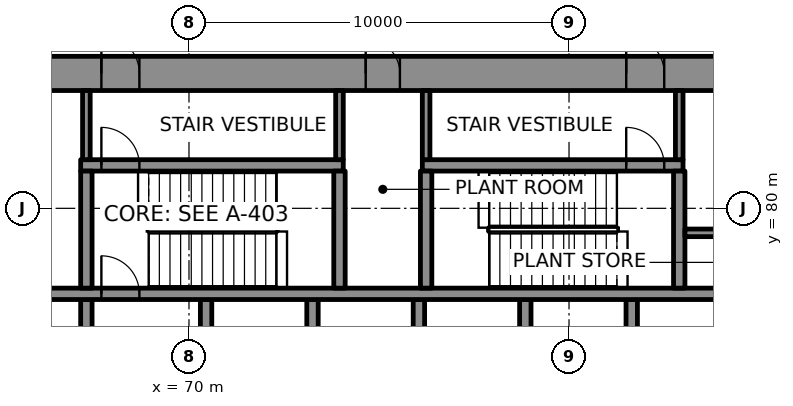
"""IFC4 building model, lengths in metres.
Left out: names, types, materials, properties, quantities, classifications, styles, units other than length and angle.
Written with IfcOpenShell. Run it as: python <this file> out.ifc"""

import sys

from ifc_helpers import new_model, si_unit, direction, frame, frame_2d, origin, place, context, subcontext, project, spatial, rectangle, extrude, element, fill, save


model = new_model("IFC4")
c1 = context("Model", 3, precision=1e-05, world=origin(), true_north=direction((0.0, 1.0)))
c2 = subcontext(c1, "Body", "Model", "MODEL_VIEW")
j1 = project(units=[si_unit("LENGTHUNIT", "METRE"), si_unit("PLANEANGLEUNIT", "RADIAN")], contexts=[c1])
p1 = place(None, origin())
s1 = spatial("IfcSite", under=j1, at=p1, CompositionType="ELEMENT")
p2 = place(p1, origin())
s2 = spatial("IfcBuilding", under=s1, at=p2, CompositionType="ELEMENT")
p3 = place(p2, frame((0.0, 0.0, 31.0)))
s3 = spatial("IfcBuildingStorey", under=s2, at=p3, CompositionType="ELEMENT", Elevation=31.0)
p4 = place(p3, frame((62.0, 83.55, 0.0), z_axis=(0.0, 0.0, 1.0), x_axis=(1.0, 0.0, 0.0)))
e1 = element("IfcWall", 1, at=p4, inside=s3, PredefinedType="SHEAR", context=c2, shape_type="SweptSolid", body=[
    extrude(rectangle(XDim=26.0, YDim=0.9, at=frame_2d((13.0, 0.0))), origin(), (0.0, 0.0, 1.0), 4.05),
])
p5 = place(p4, frame((5.695, 0.0, 0.0)))
e2 = element("IfcOpeningElement", 2, at=p5, cuts=e1, PredefinedType="OPENING", context=c2, shape_type="SweptSolid", body=[
    extrude(rectangle(XDim=1.0, YDim=2.1, at=frame_2d((0.5, 1.05))), frame((0.0, 0.46, 0.0), z_axis=(0.0, -1.0, 0.0), x_axis=(1.0, 0.0, 0.0)), (0.0, 0.0, 1.0), 0.92),
])
p6 = place(p4, frame((19.505, 0.0, 0.0)))
e3 = element("IfcOpeningElement", 3, at=p6, cuts=e1, PredefinedType="OPENING", context=c2, shape_type="SweptSolid", body=[
    extrude(rectangle(XDim=1.0, YDim=2.1, at=frame_2d((0.5, 1.05))), frame((0.0, 0.46, 0.0), z_axis=(0.0, -1.0, 0.0), x_axis=(1.0, 0.0, 0.0)), (0.0, 0.0, 1.0), 0.92),
])
p7 = place(p4, frame((3.45, 0.0, 0.0)))
e4 = element("IfcOpeningElement", 4, at=p7, cuts=e1, PredefinedType="OPENING", context=c2, shape_type="SweptSolid", body=[
    extrude(rectangle(XDim=0.9, YDim=2.1, at=frame_2d((0.45, 1.05))), frame((0.0, 0.46, 0.0), z_axis=(0.0, -1.0, 0.0), x_axis=(1.0, 0.0, 0.0)), (0.0, 0.0, 1.0), 0.92),
])
p8 = place(p4, frame((12.65, 0.0, 0.0)))
e5 = element("IfcOpeningElement", 5, at=p8, cuts=e1, PredefinedType="OPENING", context=c2, shape_type="SweptSolid", body=[
    extrude(rectangle(XDim=0.9, YDim=2.1, at=frame_2d((0.45, 1.05))), frame((0.0, 0.46, 0.0), z_axis=(0.0, -1.0, 0.0), x_axis=(1.0, 0.0, 0.0)), (0.0, 0.0, 1.0), 0.92),
])
p9 = place(p4, frame((22.55, 0.0, 0.0)))
e6 = element("IfcOpeningElement", 6, at=p9, cuts=e1, PredefinedType="OPENING", context=c2, shape_type="SweptSolid", body=[
    extrude(rectangle(XDim=0.9, YDim=2.1, at=frame_2d((0.45, 1.05))), frame((0.0, 0.46, 0.0), z_axis=(0.0, -1.0, 0.0), x_axis=(1.0, 0.0, 0.0)), (0.0, 0.0, 1.0), 0.92),
])
p10 = place(p3, frame((67.3, 75.0, 0.0), z_axis=(0.0, 0.0, 1.0), x_axis=(0.0, 1.0, 0.0)))
e7 = element("IfcWall", 7, at=p10, inside=s3, PredefinedType="SHEAR", context=c2, shape_type="SweptSolid", body=[
    extrude(rectangle(XDim=2.6, YDim=0.3, at=frame_2d((1.3, 0.0))), origin(), (0.0, 0.0, 1.0), 4.05),
])
p11 = place(p3, frame((70.45, 75.0, 0.0), z_axis=(0.0, 0.0, 1.0), x_axis=(0.0, 1.0, 0.0)))
e8 = element("IfcWall", 8, at=p11, inside=s3, PredefinedType="SHEAR", context=c2, shape_type="SweptSolid", body=[
    extrude(rectangle(XDim=2.6, YDim=0.3, at=frame_2d((1.3, 0.0))), origin(), (0.0, 0.0, 1.0), 4.05),
])
p12 = place(p11, frame((0.15, 0.0, 0.0)))
e9 = element("IfcOpeningElement", 9, at=p12, cuts=e8, PredefinedType="OPENING", context=c2, shape_type="SweptSolid", body=[
    extrude(rectangle(XDim=1.1, YDim=2.1, at=frame_2d((0.55, 1.05))), frame((0.0, 0.16, 0.0), z_axis=(0.0, -1.0, 0.0), x_axis=(1.0, 0.0, 0.0)), (0.0, 0.0, 1.0), 0.32),
])
for number, where, z_axis, x_axis in (
    (10, (73.25, 75.0, 0.0), (0.0, 0.0, 1.0), (0.0, 1.0, 0.0)),
    (11, (76.05, 75.0, 0.0), (0.0, 0.0, 1.0), (0.0, 1.0, 0.0)),
    (12, (78.85, 75.0, 0.0), (0.0, 0.0, 1.0), (0.0, 1.0, 0.0)),
    (13, (81.65, 75.0, 0.0), (0.0, 0.0, 1.0), (0.0, 1.0, 0.0)),
):
    element("IfcWall", number, at=place(p3, frame(where, z_axis=z_axis, x_axis=x_axis)), inside=s3, PredefinedType="SHEAR", context=c2, shape_type="SweptSolid", body=[
        extrude(rectangle(XDim=2.6, YDim=0.3, at=frame_2d((1.3, 0.0))), origin(), (0.0, 0.0, 1.0), 4.05),
    ])
p13 = place(p3, frame((64.35, 77.75, 0.0), z_axis=(0.0, 0.0, 1.0), x_axis=(1.0, 0.0, 0.0)))
e14 = element("IfcWall", 14, at=p13, inside=s3, PredefinedType="SHEAR", context=c2, shape_type="SweptSolid", body=[
    extrude(rectangle(XDim=22.75, YDim=0.3, at=frame_2d((11.375, 0.0))), origin(), (0.0, 0.0, 1.0), 4.05),
])
p14 = place(p13, frame((3.345, 0.0, 0.0)))
e15 = element("IfcOpeningElement", 15, at=p14, cuts=e14, PredefinedType="OPENING", context=c2, shape_type="SweptSolid", body=[
    extrude(rectangle(XDim=1.0, YDim=2.1, at=frame_2d((0.5, 1.05))), frame((0.0, 0.16, 0.0), z_axis=(0.0, -1.0, 0.0), x_axis=(1.0, 0.0, 0.0)), (0.0, 0.0, 1.0), 0.32),
])
p15 = place(p3, frame((67.15, 81.13, 0.0), z_axis=(0.0, 0.0, 1.0), x_axis=(1.0, 0.0, 0.0)))
e16 = element("IfcWall", 16, at=p15, inside=s3, PredefinedType="SHEAR", context=c2, shape_type="SweptSolid", body=[
    extrude(rectangle(XDim=6.91, YDim=0.3, at=frame_2d((3.455, 0.0))), origin(), (0.0, 0.0, 1.0), 4.05),
])
p16 = place(p15, frame((0.545, 0.0, 0.0)))
e17 = element("IfcOpeningElement", 17, at=p16, cuts=e16, PredefinedType="OPENING", context=c2, shape_type="SweptSolid", body=[
    extrude(rectangle(XDim=1.0, YDim=2.1, at=frame_2d((0.5, 1.05))), frame((0.0, 0.16, 0.0), z_axis=(0.0, -1.0, 0.0), x_axis=(1.0, 0.0, 0.0)), (0.0, 0.0, 1.0), 0.32),
])
p17 = place(p3, frame((76.14, 81.13, 0.0), z_axis=(0.0, 0.0, 1.0), x_axis=(1.0, 0.0, 0.0)))
e18 = element("IfcWall", 18, at=p17, inside=s3, PredefinedType="SHEAR", context=c2, shape_type="SweptSolid", body=[
    extrude(rectangle(XDim=6.86, YDim=0.3, at=frame_2d((3.43, 0.0))), origin(), (0.0, 0.0, 1.0), 4.05),
])
p18 = place(p17, frame((5.365, 0.0, 0.0)))
e19 = element("IfcOpeningElement", 19, at=p18, cuts=e18, PredefinedType="OPENING", context=c2, shape_type="SweptSolid", body=[
    extrude(rectangle(XDim=1.0, YDim=2.1, at=frame_2d((0.5, 1.05))), frame((0.0, 0.16, 0.0), z_axis=(0.0, -1.0, 0.0), x_axis=(1.0, 0.0, 0.0)), (0.0, 0.0, 1.0), 0.32),
])
for number, where, z_axis, x_axis in (
    (20, (67.3, 77.9, 0.0), (0.0, 0.0, 1.0), (0.0, 1.0, 0.0)),
    (21, (73.96, 77.9, 0.0), (0.0, 0.0, 1.0), (0.0, 1.0, 0.0)),
    (22, (76.24, 77.9, 0.0), (0.0, 0.0, 1.0), (0.0, 1.0, 0.0)),
    (23, (82.9, 77.9, 0.0), (0.0, 0.0, 1.0), (0.0, 1.0, 0.0)),
):
    element("IfcWall", number, at=place(p3, frame(where, z_axis=z_axis, x_axis=x_axis)), inside=s3, PredefinedType="SHEAR", context=c2, shape_type="SweptSolid", body=[
        extrude(rectangle(XDim=3.08, YDim=0.3, at=frame_2d((1.54, 0.0))), origin(), (0.0, 0.0, 1.0), 4.05),
    ])
p19 = place(p3, frame((107.504, 60.451, 0.0), z_axis=(0.0, 0.0, 1.0), x_axis=(-0.500000550228, 0.86602508611, 0.0)))
e24 = element("IfcWall", 24, at=p19, inside=s3, PredefinedType="SOLIDWALL", context=c2, shape_type="SweptSolid", body=[
    extrude(rectangle(XDim=57.704, YDim=0.3, at=frame_2d((28.852, 0.0))), origin(), (0.0, 0.0, 1.0), 4.05),
])
p20 = place(p19, frame((0.89, 0.0, 0.8)))
e25 = element("IfcOpeningElement", 25, at=p20, cuts=e24, PredefinedType="OPENING", context=c2, shape_type="SweptSolid", body=[
    extrude(rectangle(XDim=3.0, YDim=2.4, at=frame_2d((1.5, 1.2))), frame((0.0, 0.16, 0.0), z_axis=(0.0, -1.0, 0.0), x_axis=(1.0, 0.0, 0.0)), (0.0, 0.0, 1.0), 0.32),
])
p21 = place(p19, frame((4.67, 0.0, 0.8)))
e26 = element("IfcOpeningElement", 26, at=p21, cuts=e24, PredefinedType="OPENING", context=c2, shape_type="SweptSolid", body=[
    extrude(rectangle(XDim=3.0, YDim=2.4, at=frame_2d((1.5, 1.2))), frame((0.0, 0.16, 0.0), z_axis=(0.0, -1.0, 0.0), x_axis=(1.0, 0.0, 0.0)), (0.0, 0.0, 1.0), 0.32),
])
p22 = place(p19, frame((8.451, 0.0, 0.8)))
e27 = element("IfcOpeningElement", 27, at=p22, cuts=e24, PredefinedType="OPENING", context=c2, shape_type="SweptSolid", body=[
    extrude(rectangle(XDim=3.0, YDim=2.4, at=frame_2d((1.5, 1.2))), frame((0.0, 0.16, 0.0), z_axis=(0.0, -1.0, 0.0), x_axis=(1.0, 0.0, 0.0)), (0.0, 0.0, 1.0), 0.32),
])
p23 = place(p19, frame((12.231, 0.0, 0.8)))
e28 = element("IfcOpeningElement", 28, at=p23, cuts=e24, PredefinedType="OPENING", context=c2, shape_type="SweptSolid", body=[
    extrude(rectangle(XDim=3.0, YDim=2.4, at=frame_2d((1.5, 1.2))), frame((0.0, 0.16, 0.0), z_axis=(0.0, -1.0, 0.0), x_axis=(1.0, 0.0, 0.0)), (0.0, 0.0, 1.0), 0.32),
])
p24 = place(p19, frame((16.011, 0.0, 0.8)))
e29 = element("IfcOpeningElement", 29, at=p24, cuts=e24, PredefinedType="OPENING", context=c2, shape_type="SweptSolid", body=[
    extrude(rectangle(XDim=3.0, YDim=2.4, at=frame_2d((1.5, 1.2))), frame((0.0, 0.16, 0.0), z_axis=(0.0, -1.0, 0.0), x_axis=(1.0, 0.0, 0.0)), (0.0, 0.0, 1.0), 0.32),
])
p25 = place(p19, frame((19.792, 0.0, 0.8)))
e30 = element("IfcOpeningElement", 30, at=p25, cuts=e24, PredefinedType="OPENING", context=c2, shape_type="SweptSolid", body=[
    extrude(rectangle(XDim=3.0, YDim=2.4, at=frame_2d((1.5, 1.2))), frame((0.0, 0.16, 0.0), z_axis=(0.0, -1.0, 0.0), x_axis=(1.0, 0.0, 0.0)), (0.0, 0.0, 1.0), 0.32),
])
p26 = place(p19, frame((23.572, 0.0, 0.8)))
e31 = element("IfcOpeningElement", 31, at=p26, cuts=e24, PredefinedType="OPENING", context=c2, shape_type="SweptSolid", body=[
    extrude(rectangle(XDim=3.0, YDim=2.4, at=frame_2d((1.5, 1.2))), frame((0.0, 0.16, 0.0), z_axis=(0.0, -1.0, 0.0), x_axis=(1.0, 0.0, 0.0)), (0.0, 0.0, 1.0), 0.32),
])
p27 = place(p19, frame((27.352, 0.0, 0.8)))
e32 = element("IfcOpeningElement", 32, at=p27, cuts=e24, PredefinedType="OPENING", context=c2, shape_type="SweptSolid", body=[
    extrude(rectangle(XDim=3.0, YDim=2.4, at=frame_2d((1.5, 1.2))), frame((0.0, 0.16, 0.0), z_axis=(0.0, -1.0, 0.0), x_axis=(1.0, 0.0, 0.0)), (0.0, 0.0, 1.0), 0.32),
])
p28 = place(p19, frame((31.132, 0.0, 0.8)))
e33 = element("IfcOpeningElement", 33, at=p28, cuts=e24, PredefinedType="OPENING", context=c2, shape_type="SweptSolid", body=[
    extrude(rectangle(XDim=3.0, YDim=2.4, at=frame_2d((1.5, 1.2))), frame((0.0, 0.16, 0.0), z_axis=(0.0, -1.0, 0.0), x_axis=(1.0, 0.0, 0.0)), (0.0, 0.0, 1.0), 0.32),
])
p29 = place(p19, frame((34.913, 0.0, 0.8)))
e34 = element("IfcOpeningElement", 34, at=p29, cuts=e24, PredefinedType="OPENING", context=c2, shape_type="SweptSolid", body=[
    extrude(rectangle(XDim=3.0, YDim=2.4, at=frame_2d((1.5, 1.2))), frame((0.0, 0.16, 0.0), z_axis=(0.0, -1.0, 0.0), x_axis=(1.0, 0.0, 0.0)), (0.0, 0.0, 1.0), 0.32),
])
p30 = place(p19, frame((38.693, 0.0, 0.8)))
e35 = element("IfcOpeningElement", 35, at=p30, cuts=e24, PredefinedType="OPENING", context=c2, shape_type="SweptSolid", body=[
    extrude(rectangle(XDim=3.0, YDim=2.4, at=frame_2d((1.5, 1.2))), frame((0.0, 0.16, 0.0), z_axis=(0.0, -1.0, 0.0), x_axis=(1.0, 0.0, 0.0)), (0.0, 0.0, 1.0), 0.32),
])
p31 = place(p19, frame((42.473, 0.0, 0.8)))
e36 = element("IfcOpeningElement", 36, at=p31, cuts=e24, PredefinedType="OPENING", context=c2, shape_type="SweptSolid", body=[
    extrude(rectangle(XDim=3.0, YDim=2.4, at=frame_2d((1.5, 1.2))), frame((0.0, 0.16, 0.0), z_axis=(0.0, -1.0, 0.0), x_axis=(1.0, 0.0, 0.0)), (0.0, 0.0, 1.0), 0.32),
])
p32 = place(p19, frame((46.253, 0.0, 0.8)))
e37 = element("IfcOpeningElement", 37, at=p32, cuts=e24, PredefinedType="OPENING", context=c2, shape_type="SweptSolid", body=[
    extrude(rectangle(XDim=3.0, YDim=2.4, at=frame_2d((1.5, 1.2))), frame((0.0, 0.16, 0.0), z_axis=(0.0, -1.0, 0.0), x_axis=(1.0, 0.0, 0.0)), (0.0, 0.0, 1.0), 0.32),
])
p33 = place(p19, frame((50.033, 0.0, 0.8)))
e38 = element("IfcOpeningElement", 38, at=p33, cuts=e24, PredefinedType="OPENING", context=c2, shape_type="SweptSolid", body=[
    extrude(rectangle(XDim=3.0, YDim=2.4, at=frame_2d((1.5, 1.2))), frame((0.0, 0.16, 0.0), z_axis=(0.0, -1.0, 0.0), x_axis=(1.0, 0.0, 0.0)), (0.0, 0.0, 1.0), 0.32),
])
p34 = place(p19, frame((53.814, 0.0, 0.8)))
e39 = element("IfcOpeningElement", 39, at=p34, cuts=e24, PredefinedType="OPENING", context=c2, shape_type="SweptSolid", body=[
    extrude(rectangle(XDim=3.0, YDim=2.4, at=frame_2d((1.5, 1.2))), frame((0.0, 0.16, 0.0), z_axis=(0.0, -1.0, 0.0), x_axis=(1.0, 0.0, 0.0)), (0.0, 0.0, 1.0), 0.32),
])
p35 = place(p3, frame((71.348, 110.424, 0.0), z_axis=(0.0, 0.0, 1.0), x_axis=(-0.500000550228, -0.86602508611, 0.0)))
e40 = element("IfcWall", 40, at=p35, inside=s3, PredefinedType="SOLIDWALL", context=c2, shape_type="SweptSolid", body=[
    extrude(rectangle(XDim=57.704, YDim=0.3, at=frame_2d((28.852, 0.0))), origin(), (0.0, 0.0, 1.0), 4.05),
])
p36 = place(p35, frame((0.89, 0.0, 0.8)))
e41 = element("IfcOpeningElement", 41, at=p36, cuts=e40, PredefinedType="OPENING", context=c2, shape_type="SweptSolid", body=[
    extrude(rectangle(XDim=3.0, YDim=2.4, at=frame_2d((1.5, 1.2))), frame((0.0, 0.16, 0.0), z_axis=(0.0, -1.0, 0.0), x_axis=(1.0, 0.0, 0.0)), (0.0, 0.0, 1.0), 0.32),
])
p37 = place(p35, frame((4.67, 0.0, 0.8)))
e42 = element("IfcOpeningElement", 42, at=p37, cuts=e40, PredefinedType="OPENING", context=c2, shape_type="SweptSolid", body=[
    extrude(rectangle(XDim=3.0, YDim=2.4, at=frame_2d((1.5, 1.2))), frame((0.0, 0.16, 0.0), z_axis=(0.0, -1.0, 0.0), x_axis=(1.0, 0.0, 0.0)), (0.0, 0.0, 1.0), 0.32),
])
p38 = place(p35, frame((8.451, 0.0, 0.8)))
e43 = element("IfcOpeningElement", 43, at=p38, cuts=e40, PredefinedType="OPENING", context=c2, shape_type="SweptSolid", body=[
    extrude(rectangle(XDim=3.0, YDim=2.4, at=frame_2d((1.5, 1.2))), frame((0.0, 0.16, 0.0), z_axis=(0.0, -1.0, 0.0), x_axis=(1.0, 0.0, 0.0)), (0.0, 0.0, 1.0), 0.32),
])
p39 = place(p35, frame((12.231, 0.0, 0.8)))
e44 = element("IfcOpeningElement", 44, at=p39, cuts=e40, PredefinedType="OPENING", context=c2, shape_type="SweptSolid", body=[
    extrude(rectangle(XDim=3.0, YDim=2.4, at=frame_2d((1.5, 1.2))), frame((0.0, 0.16, 0.0), z_axis=(0.0, -1.0, 0.0), x_axis=(1.0, 0.0, 0.0)), (0.0, 0.0, 1.0), 0.32),
])
p40 = place(p35, frame((16.011, 0.0, 0.8)))
e45 = element("IfcOpeningElement", 45, at=p40, cuts=e40, PredefinedType="OPENING", context=c2, shape_type="SweptSolid", body=[
    extrude(rectangle(XDim=3.0, YDim=2.4, at=frame_2d((1.5, 1.2))), frame((0.0, 0.16, 0.0), z_axis=(0.0, -1.0, 0.0), x_axis=(1.0, 0.0, 0.0)), (0.0, 0.0, 1.0), 0.32),
])
p41 = place(p35, frame((19.792, 0.0, 0.8)))
e46 = element("IfcOpeningElement", 46, at=p41, cuts=e40, PredefinedType="OPENING", context=c2, shape_type="SweptSolid", body=[
    extrude(rectangle(XDim=3.0, YDim=2.4, at=frame_2d((1.5, 1.2))), frame((0.0, 0.16, 0.0), z_axis=(0.0, -1.0, 0.0), x_axis=(1.0, 0.0, 0.0)), (0.0, 0.0, 1.0), 0.32),
])
p42 = place(p35, frame((23.572, 0.0, 0.8)))
e47 = element("IfcOpeningElement", 47, at=p42, cuts=e40, PredefinedType="OPENING", context=c2, shape_type="SweptSolid", body=[
    extrude(rectangle(XDim=3.0, YDim=2.4, at=frame_2d((1.5, 1.2))), frame((0.0, 0.16, 0.0), z_axis=(0.0, -1.0, 0.0), x_axis=(1.0, 0.0, 0.0)), (0.0, 0.0, 1.0), 0.32),
])
p43 = place(p35, frame((27.352, 0.0, 0.8)))
e48 = element("IfcOpeningElement", 48, at=p43, cuts=e40, PredefinedType="OPENING", context=c2, shape_type="SweptSolid", body=[
    extrude(rectangle(XDim=3.0, YDim=2.4, at=frame_2d((1.5, 1.2))), frame((0.0, 0.16, 0.0), z_axis=(0.0, -1.0, 0.0), x_axis=(1.0, 0.0, 0.0)), (0.0, 0.0, 1.0), 0.32),
])
p44 = place(p35, frame((31.132, 0.0, 0.8)))
e49 = element("IfcOpeningElement", 49, at=p44, cuts=e40, PredefinedType="OPENING", context=c2, shape_type="SweptSolid", body=[
    extrude(rectangle(XDim=3.0, YDim=2.4, at=frame_2d((1.5, 1.2))), frame((0.0, 0.16, 0.0), z_axis=(0.0, -1.0, 0.0), x_axis=(1.0, 0.0, 0.0)), (0.0, 0.0, 1.0), 0.32),
])
p45 = place(p35, frame((34.913, 0.0, 0.8)))
e50 = element("IfcOpeningElement", 50, at=p45, cuts=e40, PredefinedType="OPENING", context=c2, shape_type="SweptSolid", body=[
    extrude(rectangle(XDim=3.0, YDim=2.4, at=frame_2d((1.5, 1.2))), frame((0.0, 0.16, 0.0), z_axis=(0.0, -1.0, 0.0), x_axis=(1.0, 0.0, 0.0)), (0.0, 0.0, 1.0), 0.32),
])
p46 = place(p35, frame((38.693, 0.0, 0.8)))
e51 = element("IfcOpeningElement", 51, at=p46, cuts=e40, PredefinedType="OPENING", context=c2, shape_type="SweptSolid", body=[
    extrude(rectangle(XDim=3.0, YDim=2.4, at=frame_2d((1.5, 1.2))), frame((0.0, 0.16, 0.0), z_axis=(0.0, -1.0, 0.0), x_axis=(1.0, 0.0, 0.0)), (0.0, 0.0, 1.0), 0.32),
])
p47 = place(p35, frame((42.473, 0.0, 0.8)))
e52 = element("IfcOpeningElement", 52, at=p47, cuts=e40, PredefinedType="OPENING", context=c2, shape_type="SweptSolid", body=[
    extrude(rectangle(XDim=3.0, YDim=2.4, at=frame_2d((1.5, 1.2))), frame((0.0, 0.16, 0.0), z_axis=(0.0, -1.0, 0.0), x_axis=(1.0, 0.0, 0.0)), (0.0, 0.0, 1.0), 0.32),
])
p48 = place(p35, frame((46.253, 0.0, 0.8)))
e53 = element("IfcOpeningElement", 53, at=p48, cuts=e40, PredefinedType="OPENING", context=c2, shape_type="SweptSolid", body=[
    extrude(rectangle(XDim=3.0, YDim=2.4, at=frame_2d((1.5, 1.2))), frame((0.0, 0.16, 0.0), z_axis=(0.0, -1.0, 0.0), x_axis=(1.0, 0.0, 0.0)), (0.0, 0.0, 1.0), 0.32),
])
p49 = place(p35, frame((50.033, 0.0, 0.8)))
e54 = element("IfcOpeningElement", 54, at=p49, cuts=e40, PredefinedType="OPENING", context=c2, shape_type="SweptSolid", body=[
    extrude(rectangle(XDim=3.0, YDim=2.4, at=frame_2d((1.5, 1.2))), frame((0.0, 0.16, 0.0), z_axis=(0.0, -1.0, 0.0), x_axis=(1.0, 0.0, 0.0)), (0.0, 0.0, 1.0), 0.32),
])
p50 = place(p35, frame((53.814, 0.0, 0.8)))
e55 = element("IfcOpeningElement", 55, at=p50, cuts=e40, PredefinedType="OPENING", context=c2, shape_type="SweptSolid", body=[
    extrude(rectangle(XDim=3.0, YDim=2.4, at=frame_2d((1.5, 1.2))), frame((0.0, 0.16, 0.0), z_axis=(0.0, -1.0, 0.0), x_axis=(1.0, 0.0, 0.0)), (0.0, 0.0, 1.0), 0.32),
])
p51 = place(p3, frame((83.05, 79.355, 0.0), z_axis=(0.0, 0.0, 1.0), x_axis=(1.0, 0.0, 0.0)))
e56 = element("IfcWall", 56, at=p51, inside=s3, PredefinedType="PARTITIONING", context=c2, shape_type="SweptSolid", body=[
    extrude(rectangle(XDim=4.05, YDim=0.2, at=frame_2d((2.025, 0.0))), origin(), (0.0, 0.0, 1.0), 4.05),
])
for number, where, z_axis, x_axis in (
    (57, (67.3, 81.28, 0.0), (0.0, 0.0, 1.0), (0.0, 1.0, 0.0)),
    (58, (73.96, 81.28, 0.0), (0.0, 0.0, 1.0), (0.0, 1.0, 0.0)),
    (59, (76.24, 81.28, 0.0), (0.0, 0.0, 1.0), (0.0, 1.0, 0.0)),
    (60, (82.9, 81.28, 0.0), (0.0, 0.0, 1.0), (0.0, 1.0, 0.0)),
):
    element("IfcWall", number, at=place(p3, frame(where, z_axis=z_axis, x_axis=x_axis)), inside=s3, PredefinedType="PARTITIONING", context=c2, shape_type="SweptSolid", body=[
        extrude(rectangle(XDim=1.82, YDim=0.2, at=frame_2d((0.91, 0.0))), origin(), (0.0, 0.0, 1.0), 4.05),
    ])
p52 = place(p14, origin())
e61 = element("IfcDoor", 61, at=p52, inside=s3, OperationType="SINGLE_SWING_LEFT", PredefinedType="DOOR", context=c2, shape_type="SweptSolid", body=[
    extrude(rectangle(XDim=1.0, YDim=2.1, at=frame_2d((0.5, 1.05))), frame((0.0, 0.025, 0.0), z_axis=(0.0, -1.0, 0.0), x_axis=(1.0, 0.0, 0.0)), (0.0, 0.0, 1.0), 0.05),
])
fill(e15, e61)
p53 = place(p16, origin())
e62 = element("IfcDoor", 62, at=p53, inside=s3, OperationType="SINGLE_SWING_RIGHT", PredefinedType="DOOR", context=c2, shape_type="SweptSolid", body=[
    extrude(rectangle(XDim=1.0, YDim=2.1, at=frame_2d((0.5, 1.05))), frame((0.0, 0.025, 0.0), z_axis=(0.0, -1.0, 0.0), x_axis=(1.0, 0.0, 0.0)), (0.0, 0.0, 1.0), 0.05),
])
fill(e17, e62)
p54 = place(p5, origin())
e63 = element("IfcDoor", 63, at=p54, inside=s3, OperationType="SINGLE_SWING_LEFT", PredefinedType="DOOR", context=c2, shape_type="SweptSolid", body=[
    extrude(rectangle(XDim=1.0, YDim=2.1, at=frame_2d((0.5, 1.05))), frame((0.0, 0.17, 0.0), z_axis=(0.0, -1.0, 0.0), x_axis=(1.0, 0.0, 0.0)), (0.0, 0.0, 1.0), 0.34),
])
fill(e2, e63)
p55 = place(p18, origin())
e64 = element("IfcDoor", 64, at=p55, inside=s3, OperationType="SINGLE_SWING_RIGHT", PredefinedType="DOOR", context=c2, shape_type="SweptSolid", body=[
    extrude(rectangle(XDim=1.0, YDim=2.1, at=frame_2d((0.5, 1.05))), frame((0.0, 0.025, 0.0), z_axis=(0.0, -1.0, 0.0), x_axis=(1.0, 0.0, 0.0)), (0.0, 0.0, 1.0), 0.05),
])
fill(e19, e64)
p56 = place(p6, origin())
e65 = element("IfcDoor", 65, at=p56, inside=s3, OperationType="SINGLE_SWING_LEFT", PredefinedType="DOOR", context=c2, shape_type="SweptSolid", body=[
    extrude(rectangle(XDim=1.0, YDim=2.1, at=frame_2d((0.5, 1.05))), frame((0.0, 0.17, 0.0), z_axis=(0.0, -1.0, 0.0), x_axis=(1.0, 0.0, 0.0)), (0.0, 0.0, 1.0), 0.34),
])
fill(e3, e65)
p57 = place(p8, origin())
e66 = element("IfcDoor", 66, at=p57, inside=s3, OperationType="SINGLE_SWING_LEFT", PredefinedType="DOOR", context=c2, shape_type="SweptSolid", body=[
    extrude(rectangle(XDim=0.9, YDim=2.1, at=frame_2d((0.45, 1.05))), frame((0.0, 0.17, 0.0), z_axis=(0.0, -1.0, 0.0), x_axis=(1.0, 0.0, 0.0)), (0.0, 0.0, 1.0), 0.34),
])
fill(e5, e66)
save(model, sys.argv[1])
